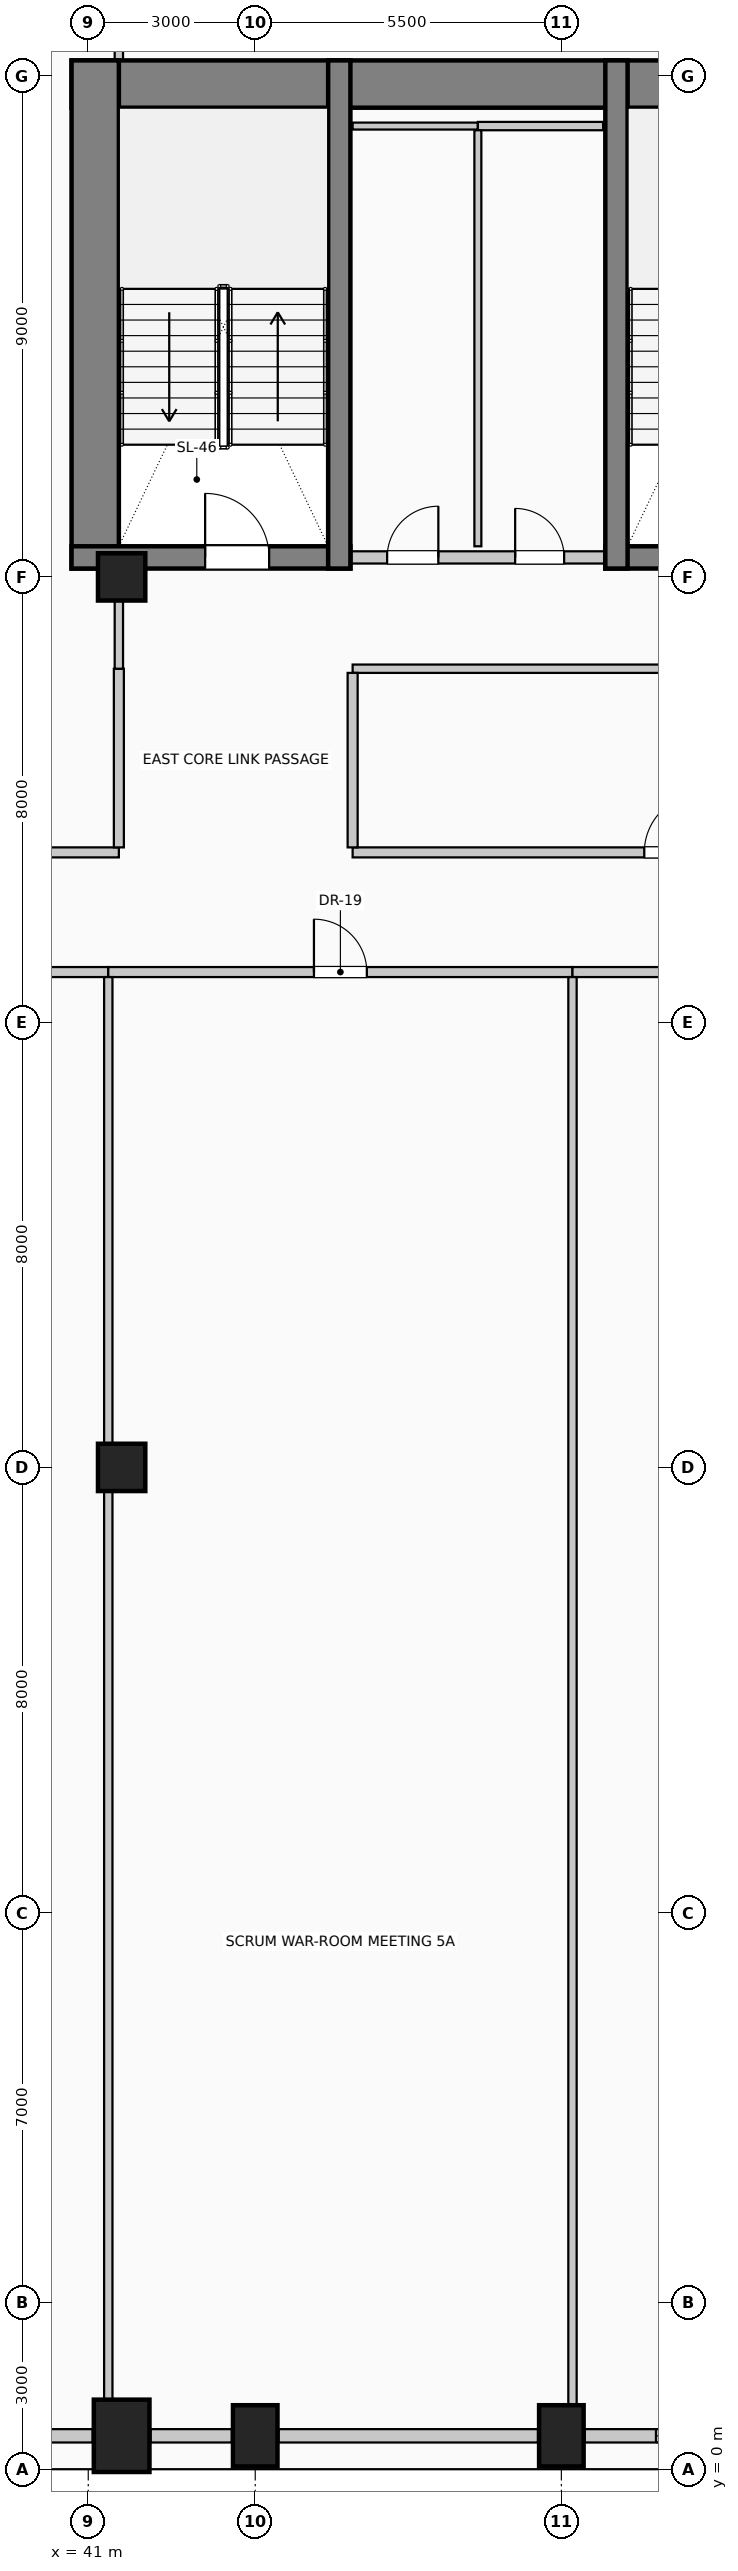
"""IFC4 building model, lengths in metres.
Left out: names, types, materials, properties, quantities, classifications, styles, units other than length and angle.
Written with IfcOpenShell. Run it as: python <this file> out.ifc"""

import sys

from ifc_helpers import new_model, si_unit, direction, frame, frame_2d, origin, origin_2d, place, context, subcontext, project, spatial, rectangle, circle, extrude, element, fill, save


model = new_model("IFC4")
c1 = context("Model", 3, precision=1e-05, world=origin(), true_north=direction((0.0, 1.0)))
c2 = subcontext(c1, "Body", "Model", "MODEL_VIEW")
j1 = project(units=[si_unit("LENGTHUNIT", "METRE"), si_unit("PLANEANGLEUNIT", "RADIAN")], contexts=[c1])
p1 = place(None, origin())
s1 = spatial("IfcSite", under=j1, at=p1, CompositionType="ELEMENT")
p2 = place(p1, origin())
s2 = spatial("IfcBuilding", under=s1, at=p2, CompositionType="ELEMENT")
p3 = place(p2, frame((0.0, 0.0, 170.6)))
s3 = spatial("IfcBuildingStorey", under=s2, at=p3, CompositionType="ELEMENT", Elevation=170.6)
p4 = place(p3, frame((40.7, 42.855, 0.0), z_axis=(0.0, 0.0, 1.0), x_axis=(1.0, 0.0, 0.0)))
e1 = element("IfcWall", 1, at=p4, inside=s3, PredefinedType="SHEAR", context=c2, shape_type="SweptSolid", body=[
    extrude(rectangle(XDim=14.6, YDim=0.85, at=frame_2d((7.3, 0.0))), origin(), (0.0, 0.0, 1.0), 4.0),
])
p5 = place(p3, frame((41.125, 34.15, 0.0), z_axis=(0.0, 0.0, 1.0), x_axis=(0.0, 1.0, 0.0)))
e2 = element("IfcWall", 2, at=p5, inside=s3, PredefinedType="SHEAR", context=c2, shape_type="SweptSolid", body=[
    extrude(rectangle(XDim=9.13, YDim=0.85, at=frame_2d((4.565, 0.0))), origin(), (0.0, 0.0, 1.0), 4.0),
])
p6 = place(p3, frame((40.7, 34.35, 0.0), z_axis=(0.0, 0.0, 1.0), x_axis=(1.0, 0.0, 0.0)))
e3 = element("IfcWall", 3, at=p6, inside=s3, PredefinedType="SHEAR", context=c2, shape_type="SweptSolid", body=[
    extrude(rectangle(XDim=5.01, YDim=0.4, at=frame_2d((2.505, 0.0))), origin(), (0.0, 0.0, 1.0), 4.0),
])
p7 = place(p6, frame((2.4, 0.0, 0.0)))
e4 = element("IfcOpeningElement", 4, at=p7, cuts=e3, PredefinedType="OPENING", context=c2, shape_type="SweptSolid", body=[
    extrude(rectangle(XDim=1.15, YDim=2.2, at=frame_2d((0.575, 1.1))), frame((0.0, 0.21, 0.0), z_axis=(0.0, -1.0, 0.0), x_axis=(1.0, 0.0, 0.0)), (0.0, 0.0, 1.0), 0.42),
])
p8 = place(p3, frame((45.51, 34.15, 0.0), z_axis=(0.0, 0.0, 1.0), x_axis=(0.0, 1.0, 0.0)))
e5 = element("IfcWall", 5, at=p8, inside=s3, PredefinedType="SHEAR", context=c2, shape_type="SweptSolid", body=[
    extrude(rectangle(XDim=9.13, YDim=0.4, at=frame_2d((4.565, 0.0))), origin(), (0.0, 0.0, 1.0), 4.0),
])
p9 = place(p3, frame((50.29, 34.35, 0.0), z_axis=(0.0, 0.0, 1.0), x_axis=(1.0, 0.0, 0.0)))
e6 = element("IfcWall", 6, at=p9, inside=s3, PredefinedType="SHEAR", context=c2, shape_type="SweptSolid", body=[
    extrude(rectangle(XDim=5.01, YDim=0.4, at=frame_2d((2.505, 0.0))), origin(), (0.0, 0.0, 1.0), 4.0),
])
p10 = place(p9, frame((1.4, 0.0, 0.0)))
e7 = element("IfcOpeningElement", 7, at=p10, cuts=e6, PredefinedType="OPENING", context=c2, shape_type="SweptSolid", body=[
    extrude(rectangle(XDim=1.15, YDim=2.2, at=frame_2d((0.575, 1.1))), frame((0.0, 0.21, 0.0), z_axis=(0.0, -1.0, 0.0), x_axis=(1.0, 0.0, 0.0)), (0.0, 0.0, 1.0), 0.42),
])
p11 = place(p3, frame((50.49, 34.15, 0.0), z_axis=(0.0, 0.0, 1.0), x_axis=(0.0, 1.0, 0.0)))
e8 = element("IfcWall", 8, at=p11, inside=s3, PredefinedType="SHEAR", context=c2, shape_type="SweptSolid", body=[
    extrude(rectangle(XDim=9.13, YDim=0.4, at=frame_2d((4.565, 0.0))), origin(), (0.0, 0.0, 1.0), 4.0),
])
p12 = place(p3, frame((41.6, 0.6, 0.0), z_axis=(0.0, 0.0, 1.0), x_axis=(1.0, 0.0, 0.0)))
e9 = element("IfcColumn", 9, at=p12, inside=s3, PredefinedType="COLUMN", context=c2, shape_type="SweptSolid", body=[
    extrude(rectangle(XDim=1.0, YDim=1.3, at=origin_2d()), origin(), (0.0, 0.0, 1.0), 4.0),
])
for number, where, z_axis, x_axis in (
    (10, (44.0, 0.6, 0.0), (0.0, 0.0, 1.0), (1.0, 0.0, 0.0)),
    (11, (49.5, 0.6, 0.0), (0.0, 0.0, 1.0), (1.0, 0.0, 0.0)),
):
    element("IfcColumn", number, at=place(p3, frame(where, z_axis=z_axis, x_axis=x_axis)), inside=s3, PredefinedType="COLUMN", context=c2, shape_type="SweptSolid", body=[
        extrude(rectangle(XDim=0.8, YDim=1.1, at=origin_2d()), origin(), (0.0, 0.0, 1.0), 4.0),
    ])
for number, where, z_axis, x_axis in (
    (12, (41.6, 18.0, 0.0), (0.0, 0.0, 1.0), (1.0, 0.0, 0.0)),
    (13, (41.6, 34.0, 0.0), (0.0, 0.0, 1.0), (1.0, 0.0, 0.0)),
):
    element("IfcColumn", number, at=place(p3, frame(where, z_axis=z_axis, x_axis=x_axis)), inside=s3, PredefinedType="COLUMN", context=c2, shape_type="SweptSolid", body=[
        extrude(circle(Radius=0.425, at=origin_2d()), origin(), (0.0, 0.0, 1.0), 4.0),
    ])
p13 = place(p3, frame((41.08, 0.6, 0.0), z_axis=(0.0, 0.0, 1.0), x_axis=(-1.0, 0.0, 0.0)))
e14 = element("IfcWall", 14, at=p13, inside=s3, PredefinedType="SOLIDWALL", context=c2, shape_type="SweptSolid", body=[
    extrude(rectangle(XDim=6.56, YDim=0.24, at=frame_2d((3.28, 0.0))), origin(), (0.0, 0.0, 1.0), 2.975),
])
p14 = place(p13, frame((1.187, 0.0, 0.42)))
e15 = element("IfcOpeningElement", 15, at=p14, cuts=e14, PredefinedType="OPENING", context=c2, shape_type="SweptSolid", body=[
    extrude(rectangle(XDim=1.5, YDim=2.2, at=frame_2d((0.75, 1.1))), frame((0.0, 0.13, 0.0), z_axis=(0.0, -1.0, 0.0), x_axis=(1.0, 0.0, 0.0)), (0.0, 0.0, 1.0), 0.26),
])
p15 = place(p13, frame((3.873, 0.0, 0.42)))
e16 = element("IfcOpeningElement", 16, at=p15, cuts=e14, PredefinedType="OPENING", context=c2, shape_type="SweptSolid", body=[
    extrude(rectangle(XDim=1.5, YDim=2.2, at=frame_2d((0.75, 1.1))), frame((0.0, 0.13, 0.0), z_axis=(0.0, -1.0, 0.0), x_axis=(1.0, 0.0, 0.0)), (0.0, 0.0, 1.0), 0.26),
])
p16 = place(p3, frame((43.58, 0.6, 0.0), z_axis=(0.0, 0.0, 1.0), x_axis=(-1.0, 0.0, 0.0)))
e17 = element("IfcWall", 17, at=p16, inside=s3, PredefinedType="SOLIDWALL", context=c2, shape_type="SweptSolid", body=[
    extrude(rectangle(XDim=1.46, YDim=0.24, at=frame_2d((0.73, 0.0))), origin(), (0.0, 0.0, 1.0), 2.975),
])
p17 = place(p3, frame((49.08, 0.6, 0.0), z_axis=(0.0, 0.0, 1.0), x_axis=(-1.0, 0.0, 0.0)))
e18 = element("IfcWall", 18, at=p17, inside=s3, PredefinedType="SOLIDWALL", context=c2, shape_type="SweptSolid", body=[
    extrude(rectangle(XDim=4.66, YDim=0.24, at=frame_2d((2.33, 0.0))), origin(), (0.0, 0.0, 1.0), 2.975),
])
p18 = place(p3, frame((53.98, 0.6, 0.0), z_axis=(0.0, 0.0, 1.0), x_axis=(-1.0, 0.0, 0.0)))
e19 = element("IfcWall", 19, at=p18, inside=s3, PredefinedType="SOLIDWALL", context=c2, shape_type="SweptSolid", body=[
    extrude(rectangle(XDim=4.06, YDim=0.24, at=frame_2d((2.03, 0.0))), origin(), (0.0, 0.0, 1.0), 2.975),
])
p19 = place(p18, frame((1.28, 0.0, 0.42)))
e20 = element("IfcOpeningElement", 20, at=p19, cuts=e19, PredefinedType="OPENING", context=c2, shape_type="SweptSolid", body=[
    extrude(rectangle(XDim=1.5, YDim=2.2, at=frame_2d((0.75, 1.1))), frame((0.0, 0.13, 0.0), z_axis=(0.0, -1.0, 0.0), x_axis=(1.0, 0.0, 0.0)), (0.0, 0.0, 1.0), 0.26),
])
p20 = place(p3, frame((45.72, 34.35, 0.0), z_axis=(0.0, 0.0, 1.0), x_axis=(1.0, 0.0, 0.0)))
e21 = element("IfcWall", 21, at=p20, inside=s3, PredefinedType="PARTITIONING", context=c2, shape_type="SweptSolid", body=[
    extrude(rectangle(XDim=4.56, YDim=0.22, at=frame_2d((2.28, 0.0))), origin(), (0.0, 0.0, 1.0), 3.725),
])
p21 = place(p20, frame((0.65, 0.0, 0.0)))
e22 = element("IfcOpeningElement", 22, at=p21, cuts=e21, PredefinedType="OPENING", context=c2, shape_type="SweptSolid", body=[
    extrude(rectangle(XDim=0.92, YDim=2.1, at=frame_2d((0.46, 1.05))), frame((0.0, 0.12, 0.0), z_axis=(0.0, -1.0, 0.0), x_axis=(1.0, 0.0, 0.0)), (0.0, 0.0, 1.0), 0.24),
])
p22 = place(p20, frame((2.95, 0.0, 0.0)))
e23 = element("IfcOpeningElement", 23, at=p22, cuts=e21, PredefinedType="OPENING", context=c2, shape_type="SweptSolid", body=[
    extrude(rectangle(XDim=0.88, YDim=2.1, at=frame_2d((0.44, 1.05))), frame((0.0, 0.12, 0.0), z_axis=(0.0, -1.0, 0.0), x_axis=(1.0, 0.0, 0.0)), (0.0, 0.0, 1.0), 0.24),
])
p23 = place(p3, frame((26.16, 26.9, 0.0), z_axis=(0.0, 0.0, 1.0), x_axis=(1.0, 0.0, 0.0)))
e24 = element("IfcWall", 24, at=p23, inside=s3, PredefinedType="PARTITIONING", context=c2, shape_type="SweptSolid", body=[
    extrude(rectangle(XDim=15.2, YDim=0.18, at=frame_2d((7.6, 0.0))), origin(), (0.0, 0.0, 1.0), 3.725),
])
p24 = place(p23, frame((6.9, 0.0, 0.0)))
e25 = element("IfcOpeningElement", 25, at=p24, cuts=e24, PredefinedType="OPENING", context=c2, shape_type="SweptSolid", body=[
    extrude(rectangle(XDim=1.4, YDim=2.2, at=frame_2d((0.7, 1.1))), frame((0.0, 0.1, 0.0), z_axis=(0.0, -1.0, 0.0), x_axis=(1.0, 0.0, 0.0)), (0.0, 0.0, 1.0), 0.2),
])
p25 = place(p3, frame((41.36, 26.9, 0.0), z_axis=(0.0, 0.0, 1.0), x_axis=(1.0, 0.0, 0.0)))
e26 = element("IfcWall", 26, at=p25, inside=s3, PredefinedType="PARTITIONING", context=c2, shape_type="SweptSolid", body=[
    extrude(rectangle(XDim=8.34, YDim=0.18, at=frame_2d((4.17, 0.0))), origin(), (0.0, 0.0, 1.0), 3.725),
])
p26 = place(p25, frame((3.695, 0.0, 0.0)))
e27 = element("IfcOpeningElement", 27, at=p26, cuts=e26, PredefinedType="OPENING", context=c2, shape_type="SweptSolid", body=[
    extrude(rectangle(XDim=0.95, YDim=2.15, at=frame_2d((0.475, 1.075))), frame((0.0, 0.1, 0.0), z_axis=(0.0, -1.0, 0.0), x_axis=(1.0, 0.0, 0.0)), (0.0, 0.0, 1.0), 0.2),
])
p27 = place(p3, frame((49.7, 26.9, 0.0), z_axis=(0.0, 0.0, 1.0), x_axis=(1.0, 0.0, 0.0)))
e28 = element("IfcWall", 28, at=p27, inside=s3, PredefinedType="PARTITIONING", context=c2, shape_type="SweptSolid", body=[
    extrude(rectangle(XDim=7.58, YDim=0.18, at=frame_2d((3.79, 0.0))), origin(), (0.0, 0.0, 1.0), 3.725),
])
p28 = place(p27, frame((3.265, 0.0, 0.0)))
e29 = element("IfcOpeningElement", 29, at=p28, cuts=e28, PredefinedType="OPENING", context=c2, shape_type="SweptSolid", body=[
    extrude(rectangle(XDim=1.05, YDim=2.15, at=frame_2d((0.525, 1.075))), frame((0.0, 0.1, 0.0), z_axis=(0.0, -1.0, 0.0), x_axis=(1.0, 0.0, 0.0)), (0.0, 0.0, 1.0), 0.2),
])
p29 = place(p3, frame((34.42, 29.05, 0.0), z_axis=(0.0, 0.0, 1.0), x_axis=(1.0, 0.0, 0.0)))
e30 = element("IfcWall", 30, at=p29, inside=s3, PredefinedType="PARTITIONING", context=c2, shape_type="SweptSolid", body=[
    extrude(rectangle(XDim=7.13, YDim=0.18, at=frame_2d((3.565, 0.0))), origin(), (0.0, 0.0, 1.0), 3.725),
])
p30 = place(p29, frame((3.09, 0.0, 0.0)))
e31 = element("IfcOpeningElement", 31, at=p30, cuts=e30, PredefinedType="OPENING", context=c2, shape_type="SweptSolid", body=[
    extrude(rectangle(XDim=0.95, YDim=2.15, at=frame_2d((0.475, 1.075))), frame((0.0, 0.1, 0.0), z_axis=(0.0, -1.0, 0.0), x_axis=(1.0, 0.0, 0.0)), (0.0, 0.0, 1.0), 0.2),
])
p31 = place(p3, frame((45.75, 29.05, 0.0), z_axis=(0.0, 0.0, 1.0), x_axis=(1.0, 0.0, 0.0)))
e32 = element("IfcWall", 32, at=p31, inside=s3, PredefinedType="PARTITIONING", context=c2, shape_type="SweptSolid", body=[
    extrude(rectangle(XDim=11.53, YDim=0.18, at=frame_2d((5.765, 0.0))), origin(), (0.0, 0.0, 1.0), 3.725),
])
p32 = place(p31, frame((5.24, 0.0, 0.0)))
e33 = element("IfcOpeningElement", 33, at=p32, cuts=e32, PredefinedType="OPENING", context=c2, shape_type="SweptSolid", body=[
    extrude(rectangle(XDim=1.05, YDim=2.15, at=frame_2d((0.525, 1.075))), frame((0.0, 0.1, 0.0), z_axis=(0.0, -1.0, 0.0), x_axis=(1.0, 0.0, 0.0)), (0.0, 0.0, 1.0), 0.2),
])
p33 = place(p3, frame((45.75, 32.35, 0.0), z_axis=(0.0, 0.0, 1.0), x_axis=(1.0, 0.0, 0.0)))
e34 = element("IfcWall", 34, at=p33, inside=s3, PredefinedType="PARTITIONING", context=c2, shape_type="SweptSolid", body=[
    extrude(rectangle(XDim=8.7, YDim=0.15, at=frame_2d((4.35, 0.0))), origin(), (0.0, 0.0, 1.0), 3.725),
])
p34 = place(p3, frame((45.75, 42.1, 0.0), z_axis=(0.0, 0.0, 1.0), x_axis=(1.0, 0.0, 0.0)))
e35 = element("IfcWall", 35, at=p34, inside=s3, PredefinedType="PARTITIONING", context=c2, shape_type="SweptSolid", body=[
    extrude(rectangle(XDim=2.25, YDim=0.125, at=frame_2d((1.125, 0.0))), origin(), (0.0, 0.0, 1.0), 3.725),
])
p35 = place(p3, frame((48.0, 42.1, 0.0), z_axis=(0.0, 0.0, 1.0), x_axis=(1.0, 0.0, 0.0)))
e36 = element("IfcWall", 36, at=p35, inside=s3, PredefinedType="PARTITIONING", context=c2, shape_type="SweptSolid", body=[
    extrude(rectangle(XDim=2.25, YDim=0.15, at=frame_2d((1.125, 0.0))), origin(), (0.0, 0.0, 1.0), 3.725),
])
p36 = place(p3, frame((41.36, 1.25, 0.0), z_axis=(0.0, 0.0, 1.0), x_axis=(0.0, 1.0, 0.0)))
e37 = element("IfcWall", 37, at=p36, inside=s3, PredefinedType="PARTITIONING", context=c2, shape_type="SweptSolid", body=[
    extrude(rectangle(XDim=16.325, YDim=0.15, at=frame_2d((8.163, 0.0))), origin(), (0.0, 0.0, 1.0), 3.12),
])
p37 = place(p3, frame((41.36, 18.425, 0.0), z_axis=(0.0, 0.0, 1.0), x_axis=(0.0, 1.0, 0.0)))
e38 = element("IfcWall", 38, at=p37, inside=s3, PredefinedType="PARTITIONING", context=c2, shape_type="SweptSolid", body=[
    extrude(rectangle(XDim=8.385, YDim=0.15, at=frame_2d((4.192, 0.0))), origin(), (0.0, 0.0, 1.0), 3.12),
])
p38 = place(p3, frame((41.55, 29.14, 0.0), z_axis=(0.0, 0.0, 1.0), x_axis=(0.0, 1.0, 0.0)))
e39 = element("IfcWall", 39, at=p38, inside=s3, PredefinedType="PARTITIONING", context=c2, shape_type="SweptSolid", body=[
    extrude(rectangle(XDim=3.21, YDim=0.18, at=frame_2d((1.605, 0.0))), origin(), (0.0, 0.0, 1.0), 3.12),
])
p39 = place(p3, frame((41.55, 32.35, 0.0), z_axis=(0.0, 0.0, 1.0), x_axis=(0.0, 1.0, 0.0)))
e40 = element("IfcWall", 40, at=p39, inside=s3, PredefinedType="PARTITIONING", context=c2, shape_type="SweptSolid", body=[
    extrude(rectangle(XDim=1.225, YDim=0.15, at=frame_2d((0.612, 0.0))), origin(), (0.0, 0.0, 1.0), 3.12),
])
p40 = place(p3, frame((41.55, 43.28, 0.0), z_axis=(0.0, 0.0, 1.0), x_axis=(0.0, 1.0, 0.0)))
e41 = element("IfcWall", 41, at=p40, inside=s3, PredefinedType="PARTITIONING", context=c2, shape_type="SweptSolid", body=[
    extrude(rectangle(XDim=1.47, YDim=0.15, at=frame_2d((0.735, 0.0))), origin(), (0.0, 0.0, 1.0), 3.725),
])
p41 = place(p3, frame((45.75, 29.14, 0.0), z_axis=(0.0, 0.0, 1.0), x_axis=(0.0, 1.0, 0.0)))
e42 = element("IfcWall", 42, at=p41, inside=s3, PredefinedType="PARTITIONING", context=c2, shape_type="SweptSolid", body=[
    extrude(rectangle(XDim=3.135, YDim=0.18, at=frame_2d((1.567, 0.0))), origin(), (0.0, 0.0, 1.0), 3.725),
])
p42 = place(p3, frame((48.0, 34.55, 0.0), z_axis=(0.0, 0.0, 1.0), x_axis=(0.0, 1.0, 0.0)))
e43 = element("IfcWall", 43, at=p42, inside=s3, PredefinedType="PARTITIONING", context=c2, shape_type="SweptSolid", body=[
    extrude(rectangle(XDim=7.475, YDim=0.125, at=frame_2d((3.737, 0.0))), origin(), (0.0, 0.0, 1.0), 3.725),
])
p43 = place(p3, frame((49.7, 1.15, 0.0), z_axis=(0.0, 0.0, 1.0), x_axis=(0.0, 1.0, 0.0)))
e44 = element("IfcWall", 44, at=p43, inside=s3, PredefinedType="PARTITIONING", context=c2, shape_type="SweptSolid", body=[
    extrude(rectangle(XDim=25.66, YDim=0.15, at=frame_2d((12.83, 0.0))), origin(), (0.0, 0.0, 1.0), 3.725),
])
p44 = place(p19, origin())
e45 = element("IfcWindow", 45, at=p44, inside=s3, PartitioningType="SINGLE_PANEL", PredefinedType="WINDOW", context=c2, shape_type="SweptSolid", body=[
    extrude(rectangle(XDim=1.5, YDim=2.2, at=frame_2d((0.75, 1.1))), frame((0.0, 0.03, 0.0), z_axis=(0.0, -1.0, 0.0), x_axis=(1.0, 0.0, 0.0)), (0.0, 0.0, 1.0), 0.06),
])
fill(e20, e45)
p45 = place(p7, origin())
e46 = element("IfcDoor", 46, at=p45, inside=s3, OperationType="SINGLE_SWING_LEFT", PredefinedType="DOOR", context=c2, shape_type="SweptSolid", body=[
    extrude(rectangle(XDim=1.15, YDim=2.2, at=frame_2d((0.575, 1.1))), frame((0.0, 0.025, 0.0), z_axis=(0.0, -1.0, 0.0), x_axis=(1.0, 0.0, 0.0)), (0.0, 0.0, 1.0), 0.05),
])
fill(e4, e46)
p46 = place(p21, origin())
e47 = element("IfcDoor", 47, at=p46, inside=s3, OperationType="SINGLE_SWING_RIGHT", PredefinedType="DOOR", context=c2, shape_type="SweptSolid", body=[
    extrude(rectangle(XDim=0.92, YDim=2.1, at=frame_2d((0.46, 1.05))), frame((0.0, 0.025, 0.0), z_axis=(0.0, -1.0, 0.0), x_axis=(1.0, 0.0, 0.0)), (0.0, 0.0, 1.0), 0.05),
])
fill(e22, e47)
p47 = place(p22, origin())
e48 = element("IfcDoor", 48, at=p47, inside=s3, OperationType="SINGLE_SWING_LEFT", PredefinedType="DOOR", context=c2, shape_type="SweptSolid", body=[
    extrude(rectangle(XDim=0.88, YDim=2.1, at=frame_2d((0.44, 1.05))), frame((0.0, 0.025, 0.0), z_axis=(0.0, -1.0, 0.0), x_axis=(1.0, 0.0, 0.0)), (0.0, 0.0, 1.0), 0.05),
])
fill(e23, e48)
p48 = place(p26, origin())
e49 = element("IfcDoor", 49, at=p48, inside=s3, OperationType="SINGLE_SWING_LEFT", PredefinedType="DOOR", context=c2, shape_type="SweptSolid", body=[
    extrude(rectangle(XDim=0.95, YDim=2.15, at=frame_2d((0.475, 1.075))), frame((0.0, 0.025, 0.0), z_axis=(0.0, -1.0, 0.0), x_axis=(1.0, 0.0, 0.0)), (0.0, 0.0, 1.0), 0.05),
])
fill(e27, e49)
p49 = place(p32, origin())
e50 = element("IfcDoor", 50, at=p49, inside=s3, OperationType="SINGLE_SWING_RIGHT", PredefinedType="DOOR", context=c2, shape_type="SweptSolid", body=[
    extrude(rectangle(XDim=1.05, YDim=2.15, at=frame_2d((0.525, 1.075))), frame((0.0, 0.025, 0.0), z_axis=(0.0, -1.0, 0.0), x_axis=(1.0, 0.0, 0.0)), (0.0, 0.0, 1.0), 0.05),
])
fill(e33, e50)
save(model, sys.argv[1])
